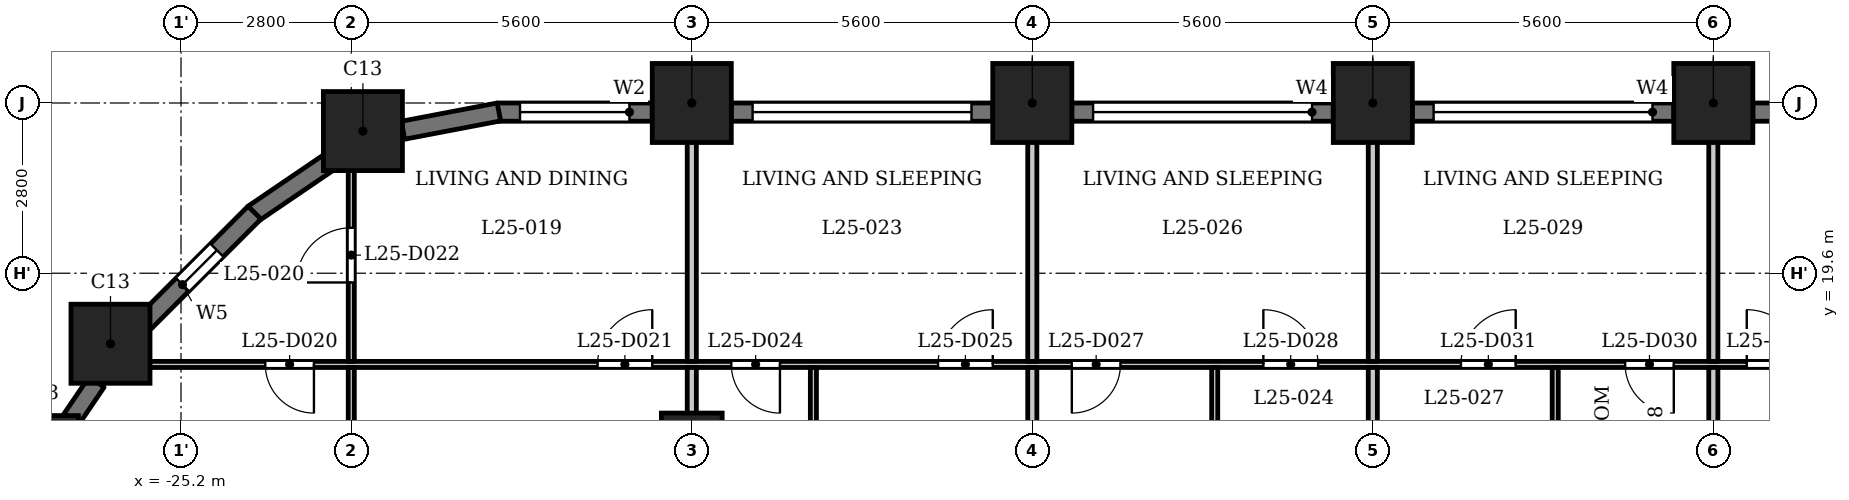
"""IFC4 building model, lengths in metres.
Left out: names, types, materials, properties, quantities, classifications, styles, units other than length and angle.
Written with IfcOpenShell. Run it as: python <this file> out.ifc"""

import sys

from ifc_helpers import new_model, si_unit, direction, frame, frame_2d, origin, origin_2d, place, context, subcontext, project, spatial, rectangle, extrude, element, fill, save


model = new_model("IFC4")
c1 = context("Model", 3, precision=1e-05, world=origin(), true_north=direction((0.0, 1.0)))
c2 = subcontext(c1, "Body", "Model", "MODEL_VIEW")
j1 = project(units=[si_unit("LENGTHUNIT", "METRE"), si_unit("PLANEANGLEUNIT", "RADIAN")], contexts=[c1])
p1 = place(None, origin())
s1 = spatial("IfcSite", under=j1, at=p1, CompositionType="ELEMENT")
p2 = place(p1, origin())
s2 = spatial("IfcBuilding", under=s1, at=p2, CompositionType="ELEMENT")
p3 = place(p2, frame((0.0, 0.0, 100.8)))
s3 = spatial("IfcBuildingStorey", under=s2, at=p3, CompositionType="ELEMENT", Elevation=100.8)
for number, where, z_axis, x_axis in (
    (1, (0.0, 22.4, 0.0), (0.0, 0.0, 1.0), (1.0, 0.0, 0.0)),
    (2, (-5.6, 22.4, 0.0), (0.0, 0.0, 1.0), (1.0, 0.0, 0.0)),
    (3, (-11.2, 22.4, 0.0), (0.0, 0.0, 1.0), (1.0, 0.0, 0.0)),
    (4, (-16.8, 22.4, 0.0), (0.0, 0.0, 1.0), (1.0, 0.0, 0.0)),
    (5, (-22.209, 21.938, 0.0), (0.0, 0.0, 1.0), (1.0, 0.0, 0.0)),
    (6, (-26.36, 18.44, 0.0), (0.0, 0.0, 1.0), (1.0, 0.0, 0.0)),
    (7, (-27.538, 16.609, 0.0), (0.0, 0.0, 1.0), (1.0, 0.0, 0.0)),
):
    element("IfcColumn", number, at=place(p3, frame(where, z_axis=z_axis, x_axis=x_axis)), inside=s3, PredefinedType="COLUMN", context=c2, shape_type="SweptSolid", body=[
        extrude(rectangle(XDim=1.3, YDim=1.3, at=origin_2d()), origin(), (0.0, 0.0, 1.0), 3.5),
    ])
p4 = place(p3, frame((-16.8, 16.8, 0.0), z_axis=(0.0, 0.0, 1.0), x_axis=(1.0, 0.0, 0.0)))
e8 = element("IfcColumn", 8, at=p4, inside=s3, PredefinedType="COLUMN", context=c2, shape_type="SweptSolid", body=[
    extrude(rectangle(XDim=1.0, YDim=1.0, at=origin_2d()), origin(), (0.0, 0.0, 1.0), 3.5),
])
p5 = place(p3, frame((4.95, 22.25, 0.0), z_axis=(0.0, 0.0, 1.0), x_axis=(-1.0, 0.0, 0.0)))
e9 = element("IfcWall", 9, at=p5, inside=s3, PredefinedType="SOLIDWALL", context=c2, shape_type="SweptSolid", body=[
    extrude(rectangle(XDim=4.3, YDim=0.3, at=frame_2d((2.15, 0.0))), origin(), (0.0, 0.0, 1.0), 2.4),
])
p6 = place(p5, frame((0.35, 0.0, 1.2)))
e10 = element("IfcOpeningElement", 10, at=p6, cuts=e9, PredefinedType="OPENING", context=c2, shape_type="SweptSolid", body=[
    extrude(rectangle(XDim=3.6, YDim=0.95, at=frame_2d((1.8, 0.475))), frame((0.0, 0.16, 0.0), z_axis=(0.0, -1.0, 0.0), x_axis=(1.0, 0.0, 0.0)), (0.0, 0.0, 1.0), 0.32),
])
p7 = place(p3, frame((-0.65, 22.25, 0.0), z_axis=(0.0, 0.0, 1.0), x_axis=(-1.0, 0.0, 0.0)))
e11 = element("IfcWall", 11, at=p7, inside=s3, PredefinedType="SOLIDWALL", context=c2, shape_type="SweptSolid", body=[
    extrude(rectangle(XDim=4.3, YDim=0.3, at=frame_2d((2.15, 0.0))), origin(), (0.0, 0.0, 1.0), 2.4),
])
p8 = place(p7, frame((0.35, 0.0, 1.2)))
e12 = element("IfcOpeningElement", 12, at=p8, cuts=e11, PredefinedType="OPENING", context=c2, shape_type="SweptSolid", body=[
    extrude(rectangle(XDim=3.6, YDim=0.95, at=frame_2d((1.8, 0.475))), frame((0.0, 0.16, 0.0), z_axis=(0.0, -1.0, 0.0), x_axis=(1.0, 0.0, 0.0)), (0.0, 0.0, 1.0), 0.32),
])
p9 = place(p3, frame((-6.25, 22.25, 0.0), z_axis=(0.0, 0.0, 1.0), x_axis=(-1.0, 0.0, 0.0)))
e13 = element("IfcWall", 13, at=p9, inside=s3, PredefinedType="SOLIDWALL", context=c2, shape_type="SweptSolid", body=[
    extrude(rectangle(XDim=4.3, YDim=0.3, at=frame_2d((2.15, 0.0))), origin(), (0.0, 0.0, 1.0), 2.4),
])
p10 = place(p9, frame((0.35, 0.0, 1.2)))
e14 = element("IfcOpeningElement", 14, at=p10, cuts=e13, PredefinedType="OPENING", context=c2, shape_type="SweptSolid", body=[
    extrude(rectangle(XDim=3.6, YDim=0.95, at=frame_2d((1.8, 0.475))), frame((0.0, 0.16, 0.0), z_axis=(0.0, -1.0, 0.0), x_axis=(1.0, 0.0, 0.0)), (0.0, 0.0, 1.0), 0.32),
])
p11 = place(p3, frame((-11.85, 22.25, 0.0), z_axis=(0.0, 0.0, 1.0), x_axis=(-1.0, 0.0, 0.0)))
e15 = element("IfcWall", 15, at=p11, inside=s3, PredefinedType="SOLIDWALL", context=c2, shape_type="SweptSolid", body=[
    extrude(rectangle(XDim=4.3, YDim=0.3, at=frame_2d((2.15, 0.0))), origin(), (0.0, 0.0, 1.0), 2.4),
])
p12 = place(p11, frame((0.35, 0.0, 1.2)))
e16 = element("IfcOpeningElement", 16, at=p12, cuts=e15, PredefinedType="OPENING", context=c2, shape_type="SweptSolid", body=[
    extrude(rectangle(XDim=3.6, YDim=0.95, at=frame_2d((1.8, 0.475))), frame((0.0, 0.16, 0.0), z_axis=(0.0, -1.0, 0.0), x_axis=(1.0, 0.0, 0.0)), (0.0, 0.0, 1.0), 0.32),
])
p13 = place(p3, frame((-17.45, 22.25, 0.0), z_axis=(0.0, 0.0, 1.0), x_axis=(-1.0, 0.0, 0.0)))
e17 = element("IfcWall", 17, at=p13, inside=s3, PredefinedType="SOLIDWALL", context=c2, shape_type="SweptSolid", body=[
    extrude(rectangle(XDim=2.55, YDim=0.3, at=frame_2d((1.275, 0.0))), origin(), (0.0, 0.0, 1.0), 2.4),
])
p14 = place(p13, frame((0.375, 0.0, 0.9)))
e18 = element("IfcOpeningElement", 18, at=p14, cuts=e17, PredefinedType="OPENING", context=c2, shape_type="SweptSolid", body=[
    extrude(rectangle(XDim=1.8, YDim=1.25, at=frame_2d((0.9, 0.625))), frame((0.0, 0.16, 0.0), z_axis=(0.0, -1.0, 0.0), x_axis=(1.0, 0.0, 0.0)), (0.0, 0.0, 1.0), 0.32),
])
for number, where, z_axis, x_axis in (
    (19, (-19.972, 22.253, 0.0), (0.0, 0.0, 1.0), (-0.982, -0.187, 0.0)),
    (20, (-22.684, 21.482, 0.0), (0.0, 0.0, 1.0), (-0.827, -0.562, 0.0)),
):
    element("IfcWall", number, at=place(p3, frame(where, z_axis=z_axis, x_axis=x_axis)), inside=s3, PredefinedType="SOLIDWALL", context=c2, shape_type="SweptSolid", body=[
        extrude(rectangle(XDim=1.606, YDim=0.3, at=frame_2d((0.803, 0.0))), origin(), (0.0, 0.0, 1.0), 2.4),
    ])
p15 = place(p3, frame((-23.991, 20.597, 0.0), z_axis=(0.0, 0.0, 1.0), x_axis=(-0.707106781187, -0.707106781187, 0.0)))
e21 = element("IfcWall", 21, at=p15, inside=s3, PredefinedType="SOLIDWALL", context=c2, shape_type="SweptSolid", body=[
    extrude(rectangle(XDim=2.55, YDim=0.3, at=frame_2d((1.275, 0.0))), origin(), (0.0, 0.0, 1.0), 2.4),
])
p16 = place(p15, frame((0.875, 0.0, 0.6)))
e22 = element("IfcOpeningElement", 22, at=p16, cuts=e21, PredefinedType="OPENING", context=c2, shape_type="SweptSolid", body=[
    extrude(rectangle(XDim=0.8, YDim=1.55, at=frame_2d((0.4, 0.775))), frame((0.0, 0.16, 0.0), z_axis=(0.0, -1.0, 0.0), x_axis=(1.0, 0.0, 0.0)), (0.0, 0.0, 1.0), 0.32),
])
p17 = place(p3, frame((-26.589, 17.81, 0.0), z_axis=(0.0, 0.0, 1.0), x_axis=(-0.562066330934, -0.827092159091, 0.0)))
e23 = element("IfcWall", 23, at=p17, inside=s3, PredefinedType="SOLIDWALL", context=c2, shape_type="SweptSolid", body=[
    extrude(rectangle(XDim=0.877, YDim=0.3, at=frame_2d((0.438, 0.0))), origin(), (0.0, 0.0, 1.0), 3.2),
])
p18 = place(p3, frame((-26.44, 18.1, 0.0), z_axis=(0.0, 0.0, 1.0), x_axis=(1.0, 0.0, 0.0)))
e24 = element("IfcWall", 24, at=p18, inside=s3, PredefinedType="PARTITIONING", context=c2, shape_type="SweptSolid", body=[
    extrude(rectangle(XDim=52.63, YDim=0.1, at=frame_2d((26.315, 0.0))), origin(), (0.0, 0.0, 1.0), 3.2),
])
p19 = place(p18, frame((2.626, 0.0, 0.0)))
e25 = element("IfcOpeningElement", 25, at=p19, cuts=e24, PredefinedType="OPENING", context=c2, shape_type="SweptSolid", body=[
    extrude(rectangle(XDim=0.8, YDim=2.1, at=frame_2d((0.4, 1.05))), frame((0.0, 0.06, 0.0), z_axis=(0.0, -1.0, 0.0), x_axis=(1.0, 0.0, 0.0)), (0.0, 0.0, 1.0), 0.12),
])
p20 = place(p18, frame((8.09, 0.0, 0.0)))
e26 = element("IfcOpeningElement", 26, at=p20, cuts=e24, PredefinedType="OPENING", context=c2, shape_type="SweptSolid", body=[
    extrude(rectangle(XDim=0.9, YDim=2.1, at=frame_2d((0.45, 1.05))), frame((0.0, 0.06, 0.0), z_axis=(0.0, -1.0, 0.0), x_axis=(1.0, 0.0, 0.0)), (0.0, 0.0, 1.0), 0.12),
])
p21 = place(p18, frame((10.29, 0.0, 0.0)))
e27 = element("IfcOpeningElement", 27, at=p21, cuts=e24, PredefinedType="OPENING", context=c2, shape_type="SweptSolid", body=[
    extrude(rectangle(XDim=0.8, YDim=2.1, at=frame_2d((0.4, 1.05))), frame((0.0, 0.06, 0.0), z_axis=(0.0, -1.0, 0.0), x_axis=(1.0, 0.0, 0.0)), (0.0, 0.0, 1.0), 0.12),
])
p22 = place(p18, frame((13.69, 0.0, 0.0)))
e28 = element("IfcOpeningElement", 28, at=p22, cuts=e24, PredefinedType="OPENING", context=c2, shape_type="SweptSolid", body=[
    extrude(rectangle(XDim=0.9, YDim=2.1, at=frame_2d((0.45, 1.05))), frame((0.0, 0.06, 0.0), z_axis=(0.0, -1.0, 0.0), x_axis=(1.0, 0.0, 0.0)), (0.0, 0.0, 1.0), 0.12),
])
p23 = place(p18, frame((15.89, 0.0, 0.0)))
e29 = element("IfcOpeningElement", 29, at=p23, cuts=e24, PredefinedType="OPENING", context=c2, shape_type="SweptSolid", body=[
    extrude(rectangle(XDim=0.8, YDim=2.1, at=frame_2d((0.4, 1.05))), frame((0.0, 0.06, 0.0), z_axis=(0.0, -1.0, 0.0), x_axis=(1.0, 0.0, 0.0)), (0.0, 0.0, 1.0), 0.12),
])
p24 = place(p18, frame((19.04, 0.0, 0.0)))
e30 = element("IfcOpeningElement", 30, at=p24, cuts=e24, PredefinedType="OPENING", context=c2, shape_type="SweptSolid", body=[
    extrude(rectangle(XDim=0.9, YDim=2.1, at=frame_2d((0.45, 1.05))), frame((0.0, 0.06, 0.0), z_axis=(0.0, -1.0, 0.0), x_axis=(1.0, 0.0, 0.0)), (0.0, 0.0, 1.0), 0.12),
])
p25 = place(p18, frame((24.99, 0.0, 0.0)))
e31 = element("IfcOpeningElement", 31, at=p25, cuts=e24, PredefinedType="OPENING", context=c2, shape_type="SweptSolid", body=[
    extrude(rectangle(XDim=0.8, YDim=2.1, at=frame_2d((0.4, 1.05))), frame((0.0, 0.06, 0.0), z_axis=(0.0, -1.0, 0.0), x_axis=(1.0, 0.0, 0.0)), (0.0, 0.0, 1.0), 0.12),
])
p26 = place(p18, frame((22.29, 0.0, 0.0)))
e32 = element("IfcOpeningElement", 32, at=p26, cuts=e24, PredefinedType="OPENING", context=c2, shape_type="SweptSolid", body=[
    extrude(rectangle(XDim=0.9, YDim=2.1, at=frame_2d((0.45, 1.05))), frame((0.0, 0.06, 0.0), z_axis=(0.0, -1.0, 0.0), x_axis=(1.0, 0.0, 0.0)), (0.0, 0.0, 1.0), 0.12),
])
p27 = place(p18, frame((32.69, 0.0, 0.0)))
e33 = element("IfcOpeningElement", 33, at=p27, cuts=e24, PredefinedType="OPENING", context=c2, shape_type="SweptSolid", body=[
    extrude(rectangle(XDim=0.8, YDim=2.1, at=frame_2d((0.4, 1.05))), frame((0.0, 0.06, 0.0), z_axis=(0.0, -1.0, 0.0), x_axis=(1.0, 0.0, 0.0)), (0.0, 0.0, 1.0), 0.12),
])
p28 = place(p18, frame((26.99, 0.0, 0.0)))
e34 = element("IfcOpeningElement", 34, at=p28, cuts=e24, PredefinedType="OPENING", context=c2, shape_type="SweptSolid", body=[
    extrude(rectangle(XDim=0.9, YDim=2.1, at=frame_2d((0.45, 1.05))), frame((0.0, 0.06, 0.0), z_axis=(0.0, -1.0, 0.0), x_axis=(1.0, 0.0, 0.0)), (0.0, 0.0, 1.0), 0.12),
])
p29 = place(p18, frame((41.29, 0.0, 0.0)))
e35 = element("IfcOpeningElement", 35, at=p29, cuts=e24, PredefinedType="OPENING", context=c2, shape_type="SweptSolid", body=[
    extrude(rectangle(XDim=0.8, YDim=2.1, at=frame_2d((0.4, 1.05))), frame((0.0, 0.06, 0.0), z_axis=(0.0, -1.0, 0.0), x_axis=(1.0, 0.0, 0.0)), (0.0, 0.0, 1.0), 0.12),
])
p30 = place(p18, frame((38.34, 0.0, 0.0)))
e36 = element("IfcOpeningElement", 36, at=p30, cuts=e24, PredefinedType="OPENING", context=c2, shape_type="SweptSolid", body=[
    extrude(rectangle(XDim=0.9, YDim=2.1, at=frame_2d((0.45, 1.05))), frame((0.0, 0.06, 0.0), z_axis=(0.0, -1.0, 0.0), x_axis=(1.0, 0.0, 0.0)), (0.0, 0.0, 1.0), 0.12),
])
p31 = place(p18, frame((50.74, 0.0, 0.0)))
e37 = element("IfcOpeningElement", 37, at=p31, cuts=e24, PredefinedType="OPENING", context=c2, shape_type="SweptSolid", body=[
    extrude(rectangle(XDim=0.8, YDim=2.1, at=frame_2d((0.4, 1.05))), frame((0.0, 0.06, 0.0), z_axis=(0.0, -1.0, 0.0), x_axis=(1.0, 0.0, 0.0)), (0.0, 0.0, 1.0), 0.12),
])
p32 = place(p18, frame((47.29, 0.0, 0.0)))
e38 = element("IfcOpeningElement", 38, at=p32, cuts=e24, PredefinedType="OPENING", context=c2, shape_type="SweptSolid", body=[
    extrude(rectangle(XDim=0.9, YDim=2.1, at=frame_2d((0.45, 1.05))), frame((0.0, 0.06, 0.0), z_axis=(0.0, -1.0, 0.0), x_axis=(1.0, 0.0, 0.0)), (0.0, 0.0, 1.0), 0.12),
])
p33 = place(p3, frame((-22.4, 15.475, 0.0), z_axis=(0.0, 0.0, 1.0), x_axis=(0.0, 1.0, 0.0)))
e39 = element("IfcWall", 39, at=p33, inside=s3, PredefinedType="PARTITIONING", context=c2, shape_type="SweptSolid", body=[
    extrude(rectangle(XDim=2.575, YDim=0.1, at=frame_2d((1.288, 0.0))), origin(), (0.0, 0.0, 1.0), 3.2),
])
p34 = place(p3, frame((-22.4, 18.15, 0.0), z_axis=(0.0, 0.0, 1.0), x_axis=(0.0, 1.0, 0.0)))
e40 = element("IfcWall", 40, at=p34, inside=s3, PredefinedType="PARTITIONING", context=c2, shape_type="SweptSolid", body=[
    extrude(rectangle(XDim=3.57, YDim=0.1, at=frame_2d((1.785, 0.0))), origin(), (0.0, 0.0, 1.0), 3.2),
])
p35 = place(p34, frame((1.298, 0.0, 0.0)))
e41 = element("IfcOpeningElement", 41, at=p35, cuts=e40, PredefinedType="OPENING", context=c2, shape_type="SweptSolid", body=[
    extrude(rectangle(XDim=0.9, YDim=2.1, at=frame_2d((0.45, 1.05))), frame((0.0, 0.06, 0.0), z_axis=(0.0, -1.0, 0.0), x_axis=(1.0, 0.0, 0.0)), (0.0, 0.0, 1.0), 0.12),
])
p36 = place(p3, frame((-16.8, 15.475, 0.0), z_axis=(0.0, 0.0, 1.0), x_axis=(0.0, 1.0, 0.0)))
e42 = element("IfcWall", 42, at=p36, inside=s3, PredefinedType="PARTITIONING", context=c2, shape_type="SweptSolid", body=[
    extrude(rectangle(XDim=2.575, YDim=0.15, at=frame_2d((1.288, 0.0))), origin(), (0.0, 0.0, 1.0), 3.2),
])
p37 = place(p3, frame((-16.8, 18.15, 0.0), z_axis=(0.0, 0.0, 1.0), x_axis=(0.0, 1.0, 0.0)))
e43 = element("IfcWall", 43, at=p37, inside=s3, PredefinedType="PARTITIONING", context=c2, shape_type="SweptSolid", body=[
    extrude(rectangle(XDim=4.88, YDim=0.15, at=frame_2d((2.44, 0.0))), origin(), (0.0, 0.0, 1.0), 3.2),
])
p38 = place(p3, frame((-14.8, 15.475, 0.0), z_axis=(0.0, 0.0, 1.0), x_axis=(0.0, 1.0, 0.0)))
e44 = element("IfcWall", 44, at=p38, inside=s3, PredefinedType="PARTITIONING", context=c2, shape_type="SweptSolid", body=[
    extrude(rectangle(XDim=2.575, YDim=0.1, at=frame_2d((1.288, 0.0))), origin(), (0.0, 0.0, 1.0), 3.2),
])
p39 = place(p3, frame((-11.2, 15.475, 0.0), z_axis=(0.0, 0.0, 1.0), x_axis=(0.0, 1.0, 0.0)))
e45 = element("IfcWall", 45, at=p39, inside=s3, PredefinedType="PARTITIONING", context=c2, shape_type="SweptSolid", body=[
    extrude(rectangle(XDim=2.575, YDim=0.15, at=frame_2d((1.288, 0.0))), origin(), (0.0, 0.0, 1.0), 3.2),
])
p40 = place(p3, frame((-11.2, 18.15, 0.0), z_axis=(0.0, 0.0, 1.0), x_axis=(0.0, 1.0, 0.0)))
e46 = element("IfcWall", 46, at=p40, inside=s3, PredefinedType="PARTITIONING", context=c2, shape_type="SweptSolid", body=[
    extrude(rectangle(XDim=4.88, YDim=0.15, at=frame_2d((2.44, 0.0))), origin(), (0.0, 0.0, 1.0), 3.2),
])
p41 = place(p3, frame((-8.2, 15.475, 0.0), z_axis=(0.0, 0.0, 1.0), x_axis=(0.0, 1.0, 0.0)))
e47 = element("IfcWall", 47, at=p41, inside=s3, PredefinedType="PARTITIONING", context=c2, shape_type="SweptSolid", body=[
    extrude(rectangle(XDim=2.575, YDim=0.1, at=frame_2d((1.288, 0.0))), origin(), (0.0, 0.0, 1.0), 3.2),
])
p42 = place(p3, frame((-5.6, 15.475, 0.0), z_axis=(0.0, 0.0, 1.0), x_axis=(0.0, 1.0, 0.0)))
e48 = element("IfcWall", 48, at=p42, inside=s3, PredefinedType="PARTITIONING", context=c2, shape_type="SweptSolid", body=[
    extrude(rectangle(XDim=2.575, YDim=0.15, at=frame_2d((1.288, 0.0))), origin(), (0.0, 0.0, 1.0), 3.2),
])
p43 = place(p3, frame((-5.6, 18.15, 0.0), z_axis=(0.0, 0.0, 1.0), x_axis=(0.0, 1.0, 0.0)))
e49 = element("IfcWall", 49, at=p43, inside=s3, PredefinedType="PARTITIONING", context=c2, shape_type="SweptSolid", body=[
    extrude(rectangle(XDim=4.88, YDim=0.15, at=frame_2d((2.44, 0.0))), origin(), (0.0, 0.0, 1.0), 3.2),
])
p44 = place(p3, frame((-2.6, 15.475, 0.0), z_axis=(0.0, 0.0, 1.0), x_axis=(0.0, 1.0, 0.0)))
e50 = element("IfcWall", 50, at=p44, inside=s3, PredefinedType="PARTITIONING", context=c2, shape_type="SweptSolid", body=[
    extrude(rectangle(XDim=2.575, YDim=0.1, at=frame_2d((1.288, 0.0))), origin(), (0.0, 0.0, 1.0), 3.2),
])
p45 = place(p3, frame((0.0, 15.475, 0.0), z_axis=(0.0, 0.0, 1.0), x_axis=(0.0, 1.0, 0.0)))
e51 = element("IfcWall", 51, at=p45, inside=s3, PredefinedType="PARTITIONING", context=c2, shape_type="SweptSolid", body=[
    extrude(rectangle(XDim=2.575, YDim=0.15, at=frame_2d((1.288, 0.0))), origin(), (0.0, 0.0, 1.0), 3.2),
])
p46 = place(p3, frame((0.0, 18.15, 0.0), z_axis=(0.0, 0.0, 1.0), x_axis=(0.0, 1.0, 0.0)))
e52 = element("IfcWall", 52, at=p46, inside=s3, PredefinedType="PARTITIONING", context=c2, shape_type="SweptSolid", body=[
    extrude(rectangle(XDim=4.88, YDim=0.15, at=frame_2d((2.44, 0.0))), origin(), (0.0, 0.0, 1.0), 3.2),
])
p47 = place(p19, origin())
e53 = element("IfcDoor", 53, at=p47, inside=s3, OperationType="SINGLE_SWING_RIGHT", PredefinedType="DOOR", context=c2, shape_type="SweptSolid", body=[
    extrude(rectangle(XDim=0.8, YDim=2.1, at=frame_2d((0.4, 1.05))), frame((0.0, 0.025, 0.0), z_axis=(0.0, -1.0, 0.0), x_axis=(1.0, 0.0, 0.0)), (0.0, 0.0, 1.0), 0.05),
])
fill(e25, e53)
p48 = place(p20, origin())
e54 = element("IfcDoor", 54, at=p48, inside=s3, OperationType="SINGLE_SWING_LEFT", PredefinedType="DOOR", context=c2, shape_type="SweptSolid", body=[
    extrude(rectangle(XDim=0.9, YDim=2.1, at=frame_2d((0.45, 1.05))), frame((0.0, 0.025, 0.0), z_axis=(0.0, -1.0, 0.0), x_axis=(1.0, 0.0, 0.0)), (0.0, 0.0, 1.0), 0.05),
])
fill(e26, e54)
p49 = place(p35, origin())
e55 = element("IfcDoor", 55, at=p49, inside=s3, OperationType="SINGLE_SWING_RIGHT", PredefinedType="DOOR", context=c2, shape_type="SweptSolid", body=[
    extrude(rectangle(XDim=0.9, YDim=2.1, at=frame_2d((0.45, 1.05))), frame((0.0, 0.025, 0.0), z_axis=(0.0, -1.0, 0.0), x_axis=(1.0, 0.0, 0.0)), (0.0, 0.0, 1.0), 0.05),
])
fill(e41, e55)
p50 = place(p21, origin())
e56 = element("IfcDoor", 56, at=p50, inside=s3, OperationType="SINGLE_SWING_RIGHT", PredefinedType="DOOR", context=c2, shape_type="SweptSolid", body=[
    extrude(rectangle(XDim=0.8, YDim=2.1, at=frame_2d((0.4, 1.05))), frame((0.0, 0.025, 0.0), z_axis=(0.0, -1.0, 0.0), x_axis=(1.0, 0.0, 0.0)), (0.0, 0.0, 1.0), 0.05),
])
fill(e27, e56)
p51 = place(p22, origin())
e57 = element("IfcDoor", 57, at=p51, inside=s3, OperationType="SINGLE_SWING_LEFT", PredefinedType="DOOR", context=c2, shape_type="SweptSolid", body=[
    extrude(rectangle(XDim=0.9, YDim=2.1, at=frame_2d((0.45, 1.05))), frame((0.0, 0.025, 0.0), z_axis=(0.0, -1.0, 0.0), x_axis=(1.0, 0.0, 0.0)), (0.0, 0.0, 1.0), 0.05),
])
fill(e28, e57)
p52 = place(p23, origin())
e58 = element("IfcDoor", 58, at=p52, inside=s3, OperationType="SINGLE_SWING_LEFT", PredefinedType="DOOR", context=c2, shape_type="SweptSolid", body=[
    extrude(rectangle(XDim=0.8, YDim=2.1, at=frame_2d((0.4, 1.05))), frame((0.0, 0.025, 0.0), z_axis=(0.0, -1.0, 0.0), x_axis=(1.0, 0.0, 0.0)), (0.0, 0.0, 1.0), 0.05),
])
fill(e29, e58)
p53 = place(p24, origin())
e59 = element("IfcDoor", 59, at=p53, inside=s3, OperationType="SINGLE_SWING_RIGHT", PredefinedType="DOOR", context=c2, shape_type="SweptSolid", body=[
    extrude(rectangle(XDim=0.9, YDim=2.1, at=frame_2d((0.45, 1.05))), frame((0.0, 0.025, 0.0), z_axis=(0.0, -1.0, 0.0), x_axis=(1.0, 0.0, 0.0)), (0.0, 0.0, 1.0), 0.05),
])
fill(e30, e59)
p54 = place(p25, origin())
e60 = element("IfcDoor", 60, at=p54, inside=s3, OperationType="SINGLE_SWING_RIGHT", PredefinedType="DOOR", context=c2, shape_type="SweptSolid", body=[
    extrude(rectangle(XDim=0.8, YDim=2.1, at=frame_2d((0.4, 1.05))), frame((0.0, 0.025, 0.0), z_axis=(0.0, -1.0, 0.0), x_axis=(1.0, 0.0, 0.0)), (0.0, 0.0, 1.0), 0.05),
])
fill(e31, e60)
p55 = place(p26, origin())
e61 = element("IfcDoor", 61, at=p55, inside=s3, OperationType="SINGLE_SWING_LEFT", PredefinedType="DOOR", context=c2, shape_type="SweptSolid", body=[
    extrude(rectangle(XDim=0.9, YDim=2.1, at=frame_2d((0.45, 1.05))), frame((0.0, 0.025, 0.0), z_axis=(0.0, -1.0, 0.0), x_axis=(1.0, 0.0, 0.0)), (0.0, 0.0, 1.0), 0.05),
])
fill(e32, e61)
p56 = place(p28, origin())
e62 = element("IfcDoor", 62, at=p56, inside=s3, OperationType="SINGLE_SWING_RIGHT", PredefinedType="DOOR", context=c2, shape_type="SweptSolid", body=[
    extrude(rectangle(XDim=0.9, YDim=2.1, at=frame_2d((0.45, 1.05))), frame((0.0, 0.025, 0.0), z_axis=(0.0, -1.0, 0.0), x_axis=(1.0, 0.0, 0.0)), (0.0, 0.0, 1.0), 0.05),
])
fill(e34, e62)
p57 = place(p8, origin())
e63 = element("IfcWindow", 63, at=p57, inside=s3, PartitioningType="SINGLE_PANEL", PredefinedType="WINDOW", context=c2, shape_type="SweptSolid", body=[
    extrude(rectangle(XDim=3.6, YDim=0.95, at=frame_2d((1.8, 0.475))), frame((0.0, 0.03, 0.0), z_axis=(0.0, -1.0, 0.0), x_axis=(1.0, 0.0, 0.0)), (0.0, 0.0, 1.0), 0.06),
])
fill(e12, e63)
p58 = place(p10, origin())
e64 = element("IfcWindow", 64, at=p58, inside=s3, PartitioningType="SINGLE_PANEL", PredefinedType="WINDOW", context=c2, shape_type="SweptSolid", body=[
    extrude(rectangle(XDim=3.6, YDim=0.95, at=frame_2d((1.8, 0.475))), frame((0.0, 0.03, 0.0), z_axis=(0.0, -1.0, 0.0), x_axis=(1.0, 0.0, 0.0)), (0.0, 0.0, 1.0), 0.06),
])
fill(e14, e64)
p59 = place(p12, origin())
e65 = element("IfcWindow", 65, at=p59, inside=s3, PartitioningType="SINGLE_PANEL", PredefinedType="WINDOW", context=c2, shape_type="SweptSolid", body=[
    extrude(rectangle(XDim=3.6, YDim=0.95, at=frame_2d((1.8, 0.475))), frame((0.0, 0.03, 0.0), z_axis=(0.0, -1.0, 0.0), x_axis=(1.0, 0.0, 0.0)), (0.0, 0.0, 1.0), 0.06),
])
fill(e16, e65)
p60 = place(p14, origin())
e66 = element("IfcWindow", 66, at=p60, inside=s3, PartitioningType="SINGLE_PANEL", PredefinedType="WINDOW", context=c2, shape_type="SweptSolid", body=[
    extrude(rectangle(XDim=1.8, YDim=1.25, at=frame_2d((0.9, 0.625))), frame((0.0, 0.03, 0.0), z_axis=(0.0, -1.0, 0.0), x_axis=(1.0, 0.0, 0.0)), (0.0, 0.0, 1.0), 0.06),
])
fill(e18, e66)
p61 = place(p16, origin())
e67 = element("IfcWindow", 67, at=p61, inside=s3, PartitioningType="SINGLE_PANEL", PredefinedType="WINDOW", context=c2, shape_type="SweptSolid", body=[
    extrude(rectangle(XDim=0.8, YDim=1.55, at=frame_2d((0.4, 0.775))), frame((0.0, 0.03, 0.0), z_axis=(0.0, -1.0, 0.0), x_axis=(1.0, 0.0, 0.0)), (0.0, 0.0, 1.0), 0.06),
])
fill(e22, e67)
save(model, sys.argv[1])
